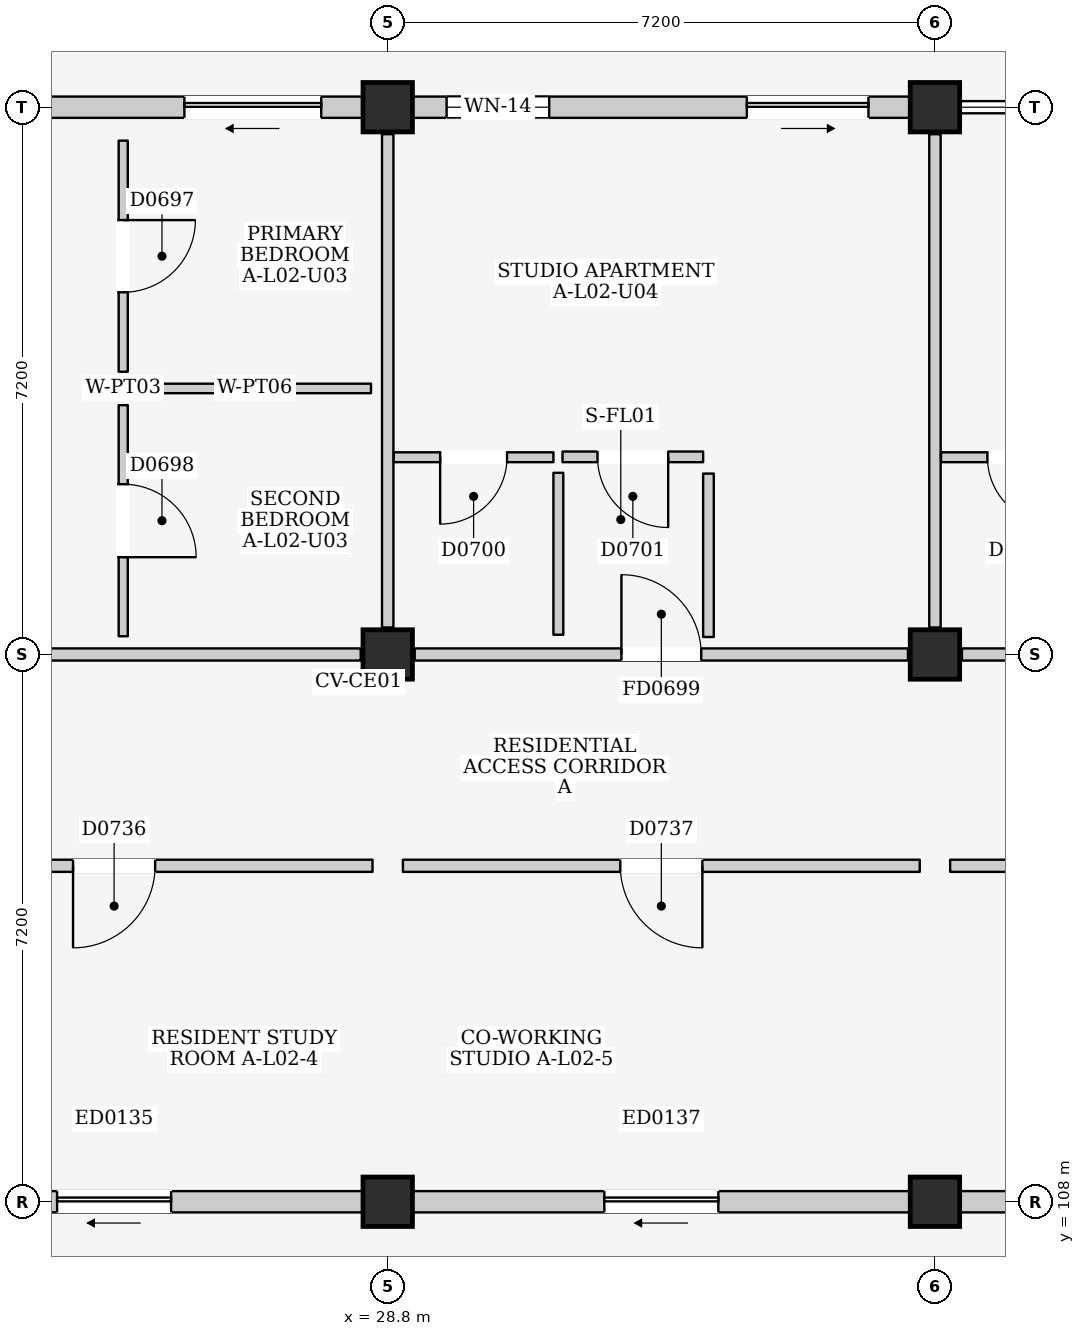
"""IFC4 building model, lengths in metres.
Left out: names, types, materials, properties, quantities, classifications, styles, units other than length and angle.
Written with IfcOpenShell. Run it as: python <this file> out.ifc"""

import sys

from ifc_helpers import new_model, si_unit, direction, frame, frame_2d, origin, origin_2d, place, context, subcontext, project, spatial, rectangle, extrude, element, fill, save


model = new_model("IFC4")
c1 = context("Model", 3, precision=1e-05, world=origin(), true_north=direction((0.0, 1.0)))
c2 = subcontext(c1, "Body", "Model", "MODEL_VIEW")
j1 = project(units=[si_unit("LENGTHUNIT", "METRE"), si_unit("PLANEANGLEUNIT", "RADIAN")], contexts=[c1])
p1 = place(None, origin())
s1 = spatial("IfcSite", under=j1, at=p1, CompositionType="ELEMENT")
p2 = place(p1, origin())
s2 = spatial("IfcBuilding", under=s1, at=p2, CompositionType="ELEMENT")
p3 = place(p2, frame((0.0, 0.0, 9.0)))
s3 = spatial("IfcBuildingStorey", under=s2, at=p3, CompositionType="ELEMENT", Elevation=9.0)
for number, where, z_axis, x_axis in (
    (1, (28.8, 108.0, 0.0), (0.0, 0.0, 1.0), (1.0, 0.0, 0.0)),
    (2, (28.8, 115.2, 0.0), (0.0, 0.0, 1.0), (1.0, 0.0, 0.0)),
    (3, (28.8, 122.4, 0.0), (0.0, 0.0, 1.0), (1.0, 0.0, 0.0)),
    (4, (36.0, 108.0, 0.0), (0.0, 0.0, 1.0), (1.0, 0.0, 0.0)),
    (5, (36.0, 115.2, 0.0), (0.0, 0.0, 1.0), (1.0, 0.0, 0.0)),
    (6, (36.0, 122.4, 0.0), (0.0, 0.0, 1.0), (1.0, 0.0, 0.0)),
):
    element("IfcColumn", number, at=place(p3, frame(where, z_axis=z_axis, x_axis=x_axis)), inside=s3, PredefinedType="COLUMN", context=c2, shape_type="SweptSolid", body=[
        extrude(rectangle(XDim=0.65, YDim=0.65, at=origin_2d()), origin(), (0.0, 0.0, 1.0), 3.2),
    ])
p4 = place(p3, frame((21.925, 122.4, 0.0), z_axis=(0.0, 0.0, 1.0), x_axis=(1.0, 0.0, 0.0)))
e7 = element("IfcWall", 7, at=p4, inside=s3, PredefinedType="ELEMENTEDWALL", context=c2, shape_type="SweptSolid", body=[
    extrude(rectangle(XDim=6.55, YDim=0.28, at=frame_2d((3.275, 0.0))), origin(), (0.0, 0.0, 1.0), 2.425),
])
p5 = place(p4, frame((4.2, 0.0, 0.0)))
e8 = element("IfcOpeningElement", 8, at=p5, cuts=e7, PredefinedType="OPENING", context=c2, shape_type="SweptSolid", body=[
    extrude(rectangle(XDim=1.8, YDim=2.12, at=frame_2d((0.9, 1.06))), frame((0.0, 0.155, 0.0), z_axis=(0.0, -1.0, 0.0), x_axis=(1.0, 0.0, 0.0)), (0.0, 0.0, 1.0), 0.31),
])
p6 = place(p4, frame((0.45, 0.0, 0.9)))
e9 = element("IfcOpeningElement", 9, at=p6, cuts=e7, PredefinedType="OPENING", context=c2, shape_type="SweptSolid", body=[
    extrude(rectangle(XDim=1.4, YDim=1.2, at=frame_2d((0.7, 0.6))), frame((0.0, 0.155, 0.0), z_axis=(0.0, -1.0, 0.0), x_axis=(1.0, 0.0, 0.0)), (0.0, 0.0, 1.0), 0.31),
])
p7 = place(p3, frame((21.925, 108.0, 0.0), z_axis=(0.0, 0.0, 1.0), x_axis=(1.0, 0.0, 0.0)))
e10 = element("IfcWall", 10, at=p7, inside=s3, PredefinedType="ELEMENTEDWALL", context=c2, shape_type="SweptSolid", body=[
    extrude(rectangle(XDim=6.55, YDim=0.28, at=frame_2d((3.275, 0.0))), origin(), (0.0, 0.0, 1.0), 2.295),
])
p8 = place(p7, frame((2.525, 0.0, 0.0)))
e11 = element("IfcOpeningElement", 11, at=p8, cuts=e10, PredefinedType="OPENING", context=c2, shape_type="SweptSolid", body=[
    extrude(rectangle(XDim=1.5, YDim=2.12, at=frame_2d((0.75, 1.06))), frame((0.0, 0.155, 0.0), z_axis=(0.0, -1.0, 0.0), x_axis=(1.0, 0.0, 0.0)), (0.0, 0.0, 1.0), 0.31),
])
p9 = place(p3, frame((29.125, 122.4, 0.0), z_axis=(0.0, 0.0, 1.0), x_axis=(1.0, 0.0, 0.0)))
e12 = element("IfcWall", 12, at=p9, inside=s3, PredefinedType="ELEMENTEDWALL", context=c2, shape_type="SweptSolid", body=[
    extrude(rectangle(XDim=6.55, YDim=0.28, at=frame_2d((3.275, 0.0))), origin(), (0.0, 0.0, 1.0), 2.425),
])
p10 = place(p9, frame((4.4, 0.0, 0.0)))
e13 = element("IfcOpeningElement", 13, at=p10, cuts=e12, PredefinedType="OPENING", context=c2, shape_type="SweptSolid", body=[
    extrude(rectangle(XDim=1.6, YDim=2.12, at=frame_2d((0.8, 1.06))), frame((0.0, 0.155, 0.0), z_axis=(0.0, -1.0, 0.0), x_axis=(1.0, 0.0, 0.0)), (0.0, 0.0, 1.0), 0.31),
])
p11 = place(p9, frame((0.45, 0.0, 0.815)))
e14 = element("IfcOpeningElement", 14, at=p11, cuts=e12, PredefinedType="OPENING", context=c2, shape_type="SweptSolid", body=[
    extrude(rectangle(XDim=1.35, YDim=1.5, at=frame_2d((0.675, 0.75))), frame((0.0, 0.155, 0.0), z_axis=(0.0, -1.0, 0.0), x_axis=(1.0, 0.0, 0.0)), (0.0, 0.0, 1.0), 0.31),
])
p12 = place(p3, frame((29.125, 108.0, 0.0), z_axis=(0.0, 0.0, 1.0), x_axis=(1.0, 0.0, 0.0)))
e15 = element("IfcWall", 15, at=p12, inside=s3, PredefinedType="ELEMENTEDWALL", context=c2, shape_type="SweptSolid", body=[
    extrude(rectangle(XDim=6.55, YDim=0.28, at=frame_2d((3.275, 0.0))), origin(), (0.0, 0.0, 1.0), 2.295),
])
p13 = place(p12, frame((2.525, 0.0, 0.0)))
e16 = element("IfcOpeningElement", 16, at=p13, cuts=e15, PredefinedType="OPENING", context=c2, shape_type="SweptSolid", body=[
    extrude(rectangle(XDim=1.5, YDim=2.12, at=frame_2d((0.75, 1.06))), frame((0.0, 0.155, 0.0), z_axis=(0.0, -1.0, 0.0), x_axis=(1.0, 0.0, 0.0)), (0.0, 0.0, 1.0), 0.31),
])
p14 = place(p3, frame((36.325, 108.0, 0.0), z_axis=(0.0, 0.0, 1.0), x_axis=(1.0, 0.0, 0.0)))
e17 = element("IfcWall", 17, at=p14, inside=s3, PredefinedType="ELEMENTEDWALL", context=c2, shape_type="SweptSolid", body=[
    extrude(rectangle(XDim=6.55, YDim=0.28, at=frame_2d((3.275, 0.0))), origin(), (0.0, 0.0, 1.0), 2.295),
])
p15 = place(p14, frame((2.525, 0.0, 0.0)))
e18 = element("IfcOpeningElement", 18, at=p15, cuts=e17, PredefinedType="OPENING", context=c2, shape_type="SweptSolid", body=[
    extrude(rectangle(XDim=1.5, YDim=2.12, at=frame_2d((0.75, 1.06))), frame((0.0, 0.155, 0.0), z_axis=(0.0, -1.0, 0.0), x_axis=(1.0, 0.0, 0.0)), (0.0, 0.0, 1.0), 0.31),
])
p16 = place(p3, frame((21.955, 115.2, 0.0), z_axis=(0.0, 0.0, 1.0), x_axis=(1.0, 0.0, 0.0)))
e19 = element("IfcWall", 19, at=p16, inside=s3, PredefinedType="PARTITIONING", context=c2, shape_type="SweptSolid", body=[
    extrude(rectangle(XDim=6.49, YDim=0.16, at=frame_2d((3.245, 0.0))), origin(), (0.0, 0.0, 1.0), 2.295),
])
p17 = place(p3, frame((28.8, 115.555, 0.0), z_axis=(0.0, 0.0, 1.0), x_axis=(0.0, 1.0, 0.0)))
e20 = element("IfcWall", 20, at=p17, inside=s3, PredefinedType="PARTITIONING", context=c2, shape_type="SweptSolid", body=[
    extrude(rectangle(XDim=6.49, YDim=0.15, at=frame_2d((3.245, 0.0))), origin(), (0.0, 0.0, 1.0), 2.395),
])
p18 = place(p3, frame((25.32, 118.92, 0.0), z_axis=(0.0, 0.0, 1.0), x_axis=(0.0, 1.0, 0.0)))
e21 = element("IfcWall", 21, at=p18, inside=s3, PredefinedType="PARTITIONING", context=c2, shape_type="SweptSolid", body=[
    extrude(rectangle(XDim=3.04, YDim=0.12, at=frame_2d((1.52, 0.0))), origin(), (0.0, 0.0, 1.0), 2.96),
])
p19 = place(p18, frame((1.045, 0.0, 0.0)))
e22 = element("IfcOpeningElement", 22, at=p19, cuts=e21, PredefinedType="OPENING", context=c2, shape_type="SweptSolid", body=[
    extrude(rectangle(XDim=0.95, YDim=2.15, at=frame_2d((0.475, 1.075))), frame((0.0, 0.075, 0.0), z_axis=(0.0, -1.0, 0.0), x_axis=(1.0, 0.0, 0.0)), (0.0, 0.0, 1.0), 0.15),
])
p20 = place(p3, frame((25.52, 118.7, 0.0), z_axis=(0.0, 0.0, 1.0), x_axis=(1.0, 0.0, 0.0)))
e23 = element("IfcWall", 23, at=p20, inside=s3, PredefinedType="PARTITIONING", context=c2, shape_type="SweptSolid", body=[
    extrude(rectangle(XDim=3.06, YDim=0.125, at=frame_2d((1.53, 0.0))), origin(), (0.0, 0.0, 1.0), 2.96),
])
p21 = place(p3, frame((25.32, 115.44, 0.0), z_axis=(0.0, 0.0, 1.0), x_axis=(0.0, 1.0, 0.0)))
e24 = element("IfcWall", 24, at=p21, inside=s3, PredefinedType="PARTITIONING", context=c2, shape_type="SweptSolid", body=[
    extrude(rectangle(XDim=3.04, YDim=0.12, at=frame_2d((1.52, 0.0))), origin(), (0.0, 0.0, 1.0), 2.96),
])
p22 = place(p21, frame((1.04, 0.0, 0.0)))
e25 = element("IfcOpeningElement", 25, at=p22, cuts=e24, PredefinedType="OPENING", context=c2, shape_type="SweptSolid", body=[
    extrude(rectangle(XDim=0.96, YDim=2.15, at=frame_2d((0.48, 1.075))), frame((0.0, 0.075, 0.0), z_axis=(0.0, -1.0, 0.0), x_axis=(1.0, 0.0, 0.0)), (0.0, 0.0, 1.0), 0.15),
])
p23 = place(p3, frame((29.155, 115.2, 0.0), z_axis=(0.0, 0.0, 1.0), x_axis=(1.0, 0.0, 0.0)))
e26 = element("IfcWall", 26, at=p23, inside=s3, PredefinedType="PARTITIONING", context=c2, shape_type="SweptSolid", body=[
    extrude(rectangle(XDim=6.49, YDim=0.16, at=frame_2d((3.245, 0.0))), origin(), (0.0, 0.0, 1.0), 2.295),
])
p24 = place(p23, frame((2.72, 0.0, 0.0)))
e27 = element("IfcOpeningElement", 27, at=p24, cuts=e26, PredefinedType="OPENING", context=c2, shape_type="SweptSolid", body=[
    extrude(rectangle(XDim=1.05, YDim=2.15, at=frame_2d((0.525, 1.075))), frame((0.0, 0.095, 0.0), z_axis=(0.0, -1.0, 0.0), x_axis=(1.0, 0.0, 0.0)), (0.0, 0.0, 1.0), 0.19),
])
p25 = place(p3, frame((36.0, 115.555, 0.0), z_axis=(0.0, 0.0, 1.0), x_axis=(0.0, 1.0, 0.0)))
e28 = element("IfcWall", 28, at=p25, inside=s3, PredefinedType="PARTITIONING", context=c2, shape_type="SweptSolid", body=[
    extrude(rectangle(XDim=6.49, YDim=0.15, at=frame_2d((3.245, 0.0))), origin(), (0.0, 0.0, 1.0), 2.395),
])
p26 = place(p3, frame((28.88, 117.795, 0.0), z_axis=(0.0, 0.0, 1.0), x_axis=(1.0, 0.0, 0.0)))
e29 = element("IfcWall", 29, at=p26, inside=s3, PredefinedType="PARTITIONING", context=c2, shape_type="SweptSolid", body=[
    extrude(rectangle(XDim=2.1, YDim=0.13, at=frame_2d((1.05, 0.0))), origin(), (0.0, 0.0, 1.0), 2.96),
])
p27 = place(p26, frame((0.61, 0.0, 0.0)))
e30 = element("IfcOpeningElement", 30, at=p27, cuts=e29, PredefinedType="OPENING", context=c2, shape_type="SweptSolid", body=[
    extrude(rectangle(XDim=0.88, YDim=2.1, at=frame_2d((0.44, 1.05))), frame((0.0, 0.08, 0.0), z_axis=(0.0, -1.0, 0.0), x_axis=(1.0, 0.0, 0.0)), (0.0, 0.0, 1.0), 0.16),
])
p28 = place(p3, frame((31.045, 115.46, 0.0), z_axis=(0.0, 0.0, 1.0), x_axis=(0.0, 1.0, 0.0)))
e31 = element("IfcWall", 31, at=p28, inside=s3, PredefinedType="PARTITIONING", context=c2, shape_type="SweptSolid", body=[
    extrude(rectangle(XDim=2.13, YDim=0.13, at=frame_2d((1.065, 0.0))), origin(), (0.0, 0.0, 1.0), 2.96),
])
p29 = place(p3, frame((31.1, 117.8, 0.0), z_axis=(0.0, 0.0, 1.0), x_axis=(1.0, 0.0, 0.0)))
e32 = element("IfcWall", 32, at=p29, inside=s3, PredefinedType="PARTITIONING", context=c2, shape_type="SweptSolid", body=[
    extrude(rectangle(XDim=1.85, YDim=0.14, at=frame_2d((0.925, 0.0))), origin(), (0.0, 0.0, 1.0), 2.96),
])
p30 = place(p29, frame((0.46, 0.0, 0.0)))
e33 = element("IfcOpeningElement", 33, at=p30, cuts=e32, PredefinedType="OPENING", context=c2, shape_type="SweptSolid", body=[
    extrude(rectangle(XDim=0.93, YDim=2.14, at=frame_2d((0.465, 1.07))), frame((0.0, 0.085, 0.0), z_axis=(0.0, -1.0, 0.0), x_axis=(1.0, 0.0, 0.0)), (0.0, 0.0, 1.0), 0.17),
])
p31 = place(p3, frame((33.02, 115.43, 0.0), z_axis=(0.0, 0.0, 1.0), x_axis=(0.0, 1.0, 0.0)))
e34 = element("IfcWall", 34, at=p31, inside=s3, PredefinedType="PARTITIONING", context=c2, shape_type="SweptSolid", body=[
    extrude(rectangle(XDim=2.15, YDim=0.14, at=frame_2d((1.075, 0.0))), origin(), (0.0, 0.0, 1.0), 2.96),
])
p32 = place(p3, frame((36.355, 115.2, 0.0), z_axis=(0.0, 0.0, 1.0), x_axis=(1.0, 0.0, 0.0)))
e35 = element("IfcWall", 35, at=p32, inside=s3, PredefinedType="PARTITIONING", context=c2, shape_type="SweptSolid", body=[
    extrude(rectangle(XDim=6.49, YDim=0.16, at=frame_2d((3.245, 0.0))), origin(), (0.0, 0.0, 1.0), 2.295),
])
p33 = place(p32, frame((2.72, 0.0, 0.0)))
e36 = element("IfcOpeningElement", 36, at=p33, cuts=e35, PredefinedType="OPENING", context=c2, shape_type="SweptSolid", body=[
    extrude(rectangle(XDim=1.05, YDim=2.15, at=frame_2d((0.525, 1.075))), frame((0.0, 0.095, 0.0), z_axis=(0.0, -1.0, 0.0), x_axis=(1.0, 0.0, 0.0)), (0.0, 0.0, 1.0), 0.19),
])
p34 = place(p3, frame((36.08, 117.795, 0.0), z_axis=(0.0, 0.0, 1.0), x_axis=(1.0, 0.0, 0.0)))
e37 = element("IfcWall", 37, at=p34, inside=s3, PredefinedType="PARTITIONING", context=c2, shape_type="SweptSolid", body=[
    extrude(rectangle(XDim=2.1, YDim=0.13, at=frame_2d((1.05, 0.0))), origin(), (0.0, 0.0, 1.0), 2.96),
])
p35 = place(p34, frame((0.61, 0.0, 0.0)))
e38 = element("IfcOpeningElement", 38, at=p35, cuts=e37, PredefinedType="OPENING", context=c2, shape_type="SweptSolid", body=[
    extrude(rectangle(XDim=0.88, YDim=2.1, at=frame_2d((0.44, 1.05))), frame((0.0, 0.08, 0.0), z_axis=(0.0, -1.0, 0.0), x_axis=(1.0, 0.0, 0.0)), (0.0, 0.0, 1.0), 0.16),
])
p36 = place(p3, frame((21.8, 112.42, 0.0), z_axis=(0.0, 0.0, 1.0), x_axis=(1.0, 0.0, 0.0)))
e39 = element("IfcWall", 39, at=p36, inside=s3, PredefinedType="PARTITIONING", context=c2, shape_type="SweptSolid", body=[
    extrude(rectangle(XDim=6.8, YDim=0.16, at=frame_2d((3.4, 0.0))), origin(), (0.0, 0.0, 1.0), 2.96),
])
p37 = place(p36, frame((2.86, 0.0, 0.0)))
e40 = element("IfcOpeningElement", 40, at=p37, cuts=e39, PredefinedType="OPENING", context=c2, shape_type="SweptSolid", body=[
    extrude(rectangle(XDim=1.08, YDim=2.22, at=frame_2d((0.54, 1.11))), frame((0.0, 0.095, 0.0), z_axis=(0.0, -1.0, 0.0), x_axis=(1.0, 0.0, 0.0)), (0.0, 0.0, 1.0), 0.19),
])
p38 = place(p3, frame((29.0, 112.42, 0.0), z_axis=(0.0, 0.0, 1.0), x_axis=(1.0, 0.0, 0.0)))
e41 = element("IfcWall", 41, at=p38, inside=s3, PredefinedType="PARTITIONING", context=c2, shape_type="SweptSolid", body=[
    extrude(rectangle(XDim=6.8, YDim=0.16, at=frame_2d((3.4, 0.0))), origin(), (0.0, 0.0, 1.0), 2.96),
])
p39 = place(p38, frame((2.86, 0.0, 0.0)))
e42 = element("IfcOpeningElement", 42, at=p39, cuts=e41, PredefinedType="OPENING", context=c2, shape_type="SweptSolid", body=[
    extrude(rectangle(XDim=1.08, YDim=2.22, at=frame_2d((0.54, 1.11))), frame((0.0, 0.095, 0.0), z_axis=(0.0, -1.0, 0.0), x_axis=(1.0, 0.0, 0.0)), (0.0, 0.0, 1.0), 0.19),
])
p40 = place(p3, frame((36.2, 112.42, 0.0), z_axis=(0.0, 0.0, 1.0), x_axis=(1.0, 0.0, 0.0)))
e43 = element("IfcWall", 43, at=p40, inside=s3, PredefinedType="PARTITIONING", context=c2, shape_type="SweptSolid", body=[
    extrude(rectangle(XDim=6.8, YDim=0.16, at=frame_2d((3.4, 0.0))), origin(), (0.0, 0.0, 1.0), 2.96),
])
p41 = place(p40, frame((2.86, 0.0, 0.0)))
e44 = element("IfcOpeningElement", 44, at=p41, cuts=e43, PredefinedType="OPENING", context=c2, shape_type="SweptSolid", body=[
    extrude(rectangle(XDim=1.08, YDim=2.22, at=frame_2d((0.54, 1.11))), frame((0.0, 0.095, 0.0), z_axis=(0.0, -1.0, 0.0), x_axis=(1.0, 0.0, 0.0)), (0.0, 0.0, 1.0), 0.19),
])
p42 = place(p5, frame((1.8, 0.0, 0.0), z_axis=(0.0, 0.0, 1.0), x_axis=(-1.0, 0.0, 0.0)))
e45 = element("IfcDoor", 45, at=p42, inside=s3, OperationType="SLIDING_TO_LEFT", PredefinedType="DOOR", context=c2, shape_type="SweptSolid", body=[
    extrude(rectangle(XDim=1.8, YDim=2.12, at=frame_2d((0.9, 1.06))), frame((0.0, 0.025, 0.0), z_axis=(0.0, -1.0, 0.0), x_axis=(1.0, 0.0, 0.0)), (0.0, 0.0, 1.0), 0.05),
])
fill(e8, e45)
p43 = place(p8, frame((1.5, 0.0, 0.0), z_axis=(0.0, 0.0, 1.0), x_axis=(-1.0, 0.0, 0.0)))
e46 = element("IfcDoor", 46, at=p43, inside=s3, OperationType="SLIDING_TO_LEFT", PredefinedType="DOOR", context=c2, shape_type="SweptSolid", body=[
    extrude(rectangle(XDim=1.5, YDim=2.12, at=frame_2d((0.75, 1.06))), frame((0.0, 0.025, 0.0), z_axis=(0.0, -1.0, 0.0), x_axis=(1.0, 0.0, 0.0)), (0.0, 0.0, 1.0), 0.05),
])
fill(e11, e46)
p44 = place(p10, frame((1.6, 0.0, 0.0), z_axis=(0.0, 0.0, 1.0), x_axis=(-1.0, 0.0, 0.0)))
e47 = element("IfcDoor", 47, at=p44, inside=s3, OperationType="SLIDING_TO_RIGHT", PredefinedType="DOOR", context=c2, shape_type="SweptSolid", body=[
    extrude(rectangle(XDim=1.6, YDim=2.12, at=frame_2d((0.8, 1.06))), frame((0.0, 0.025, 0.0), z_axis=(0.0, -1.0, 0.0), x_axis=(1.0, 0.0, 0.0)), (0.0, 0.0, 1.0), 0.05),
])
fill(e13, e47)
p45 = place(p11, origin())
e48 = element("IfcWindow", 48, at=p45, inside=s3, PartitioningType="SINGLE_PANEL", PredefinedType="WINDOW", context=c2, shape_type="SweptSolid", body=[
    extrude(rectangle(XDim=1.35, YDim=1.5, at=frame_2d((0.675, 0.75))), frame((0.0, 0.03, 0.0), z_axis=(0.0, -1.0, 0.0), x_axis=(1.0, 0.0, 0.0)), (0.0, 0.0, 1.0), 0.06),
])
fill(e14, e48)
p46 = place(p13, frame((1.5, 0.0, 0.0), z_axis=(0.0, 0.0, 1.0), x_axis=(-1.0, 0.0, 0.0)))
e49 = element("IfcDoor", 49, at=p46, inside=s3, OperationType="SLIDING_TO_LEFT", PredefinedType="DOOR", context=c2, shape_type="SweptSolid", body=[
    extrude(rectangle(XDim=1.5, YDim=2.12, at=frame_2d((0.75, 1.06))), frame((0.0, 0.025, 0.0), z_axis=(0.0, -1.0, 0.0), x_axis=(1.0, 0.0, 0.0)), (0.0, 0.0, 1.0), 0.05),
])
fill(e16, e49)
p47 = place(p19, frame((0.95, 0.0, 0.0), z_axis=(0.0, 0.0, 1.0), x_axis=(-1.0, 0.0, 0.0)))
e50 = element("IfcDoor", 50, at=p47, inside=s3, OperationType="SINGLE_SWING_LEFT", PredefinedType="DOOR", context=c2, shape_type="SweptSolid", body=[
    extrude(rectangle(XDim=0.95, YDim=2.15, at=frame_2d((0.475, 1.075))), frame((0.0, 0.025, 0.0), z_axis=(0.0, -1.0, 0.0), x_axis=(1.0, 0.0, 0.0)), (0.0, 0.0, 1.0), 0.05),
])
fill(e22, e50)
p48 = place(p22, frame((0.96, 0.0, 0.0), z_axis=(0.0, 0.0, 1.0), x_axis=(-1.0, 0.0, 0.0)))
e51 = element("IfcDoor", 51, at=p48, inside=s3, OperationType="SINGLE_SWING_RIGHT", PredefinedType="DOOR", context=c2, shape_type="SweptSolid", body=[
    extrude(rectangle(XDim=0.96, YDim=2.15, at=frame_2d((0.48, 1.075))), frame((0.0, 0.025, 0.0), z_axis=(0.0, -1.0, 0.0), x_axis=(1.0, 0.0, 0.0)), (0.0, 0.0, 1.0), 0.05),
])
fill(e25, e51)
p49 = place(p24, origin())
e52 = element("IfcDoor", 52, at=p49, inside=s3, OperationType="SINGLE_SWING_LEFT", PredefinedType="DOOR", context=c2, shape_type="SweptSolid", body=[
    extrude(rectangle(XDim=1.05, YDim=2.15, at=frame_2d((0.525, 1.075))), frame((0.0, 0.025, 0.0), z_axis=(0.0, -1.0, 0.0), x_axis=(1.0, 0.0, 0.0)), (0.0, 0.0, 1.0), 0.05),
])
fill(e27, e52)
p50 = place(p27, frame((0.88, 0.0, 0.0), z_axis=(0.0, 0.0, 1.0), x_axis=(-1.0, 0.0, 0.0)))
e53 = element("IfcDoor", 53, at=p50, inside=s3, OperationType="SINGLE_SWING_RIGHT", PredefinedType="DOOR", context=c2, shape_type="SweptSolid", body=[
    extrude(rectangle(XDim=0.88, YDim=2.1, at=frame_2d((0.44, 1.05))), frame((0.0, 0.025, 0.0), z_axis=(0.0, -1.0, 0.0), x_axis=(1.0, 0.0, 0.0)), (0.0, 0.0, 1.0), 0.05),
])
fill(e30, e53)
p51 = place(p30, frame((0.93, 0.0, 0.0), z_axis=(0.0, 0.0, 1.0), x_axis=(-1.0, 0.0, 0.0)))
e54 = element("IfcDoor", 54, at=p51, inside=s3, OperationType="SINGLE_SWING_LEFT", PredefinedType="DOOR", context=c2, shape_type="SweptSolid", body=[
    extrude(rectangle(XDim=0.93, YDim=2.14, at=frame_2d((0.465, 1.07))), frame((0.0, 0.025, 0.0), z_axis=(0.0, -1.0, 0.0), x_axis=(1.0, 0.0, 0.0)), (0.0, 0.0, 1.0), 0.05),
])
fill(e33, e54)
p52 = place(p35, frame((0.88, 0.0, 0.0), z_axis=(0.0, 0.0, 1.0), x_axis=(-1.0, 0.0, 0.0)))
e55 = element("IfcDoor", 55, at=p52, inside=s3, OperationType="SINGLE_SWING_LEFT", PredefinedType="DOOR", context=c2, shape_type="SweptSolid", body=[
    extrude(rectangle(XDim=0.88, YDim=2.1, at=frame_2d((0.44, 1.05))), frame((0.0, 0.025, 0.0), z_axis=(0.0, -1.0, 0.0), x_axis=(1.0, 0.0, 0.0)), (0.0, 0.0, 1.0), 0.05),
])
fill(e38, e55)
p53 = place(p37, frame((1.08, 0.0, 0.0), z_axis=(0.0, 0.0, 1.0), x_axis=(-1.0, 0.0, 0.0)))
e56 = element("IfcDoor", 56, at=p53, inside=s3, OperationType="SINGLE_SWING_RIGHT", PredefinedType="DOOR", context=c2, shape_type="SweptSolid", body=[
    extrude(rectangle(XDim=1.08, YDim=2.22, at=frame_2d((0.54, 1.11))), frame((0.0, 0.025, 0.0), z_axis=(0.0, -1.0, 0.0), x_axis=(1.0, 0.0, 0.0)), (0.0, 0.0, 1.0), 0.05),
])
fill(e40, e56)
p54 = place(p39, frame((1.08, 0.0, 0.0), z_axis=(0.0, 0.0, 1.0), x_axis=(-1.0, 0.0, 0.0)))
e57 = element("IfcDoor", 57, at=p54, inside=s3, OperationType="SINGLE_SWING_LEFT", PredefinedType="DOOR", context=c2, shape_type="SweptSolid", body=[
    extrude(rectangle(XDim=1.08, YDim=2.22, at=frame_2d((0.54, 1.11))), frame((0.0, 0.025, 0.0), z_axis=(0.0, -1.0, 0.0), x_axis=(1.0, 0.0, 0.0)), (0.0, 0.0, 1.0), 0.05),
])
fill(e42, e57)
save(model, sys.argv[1])
